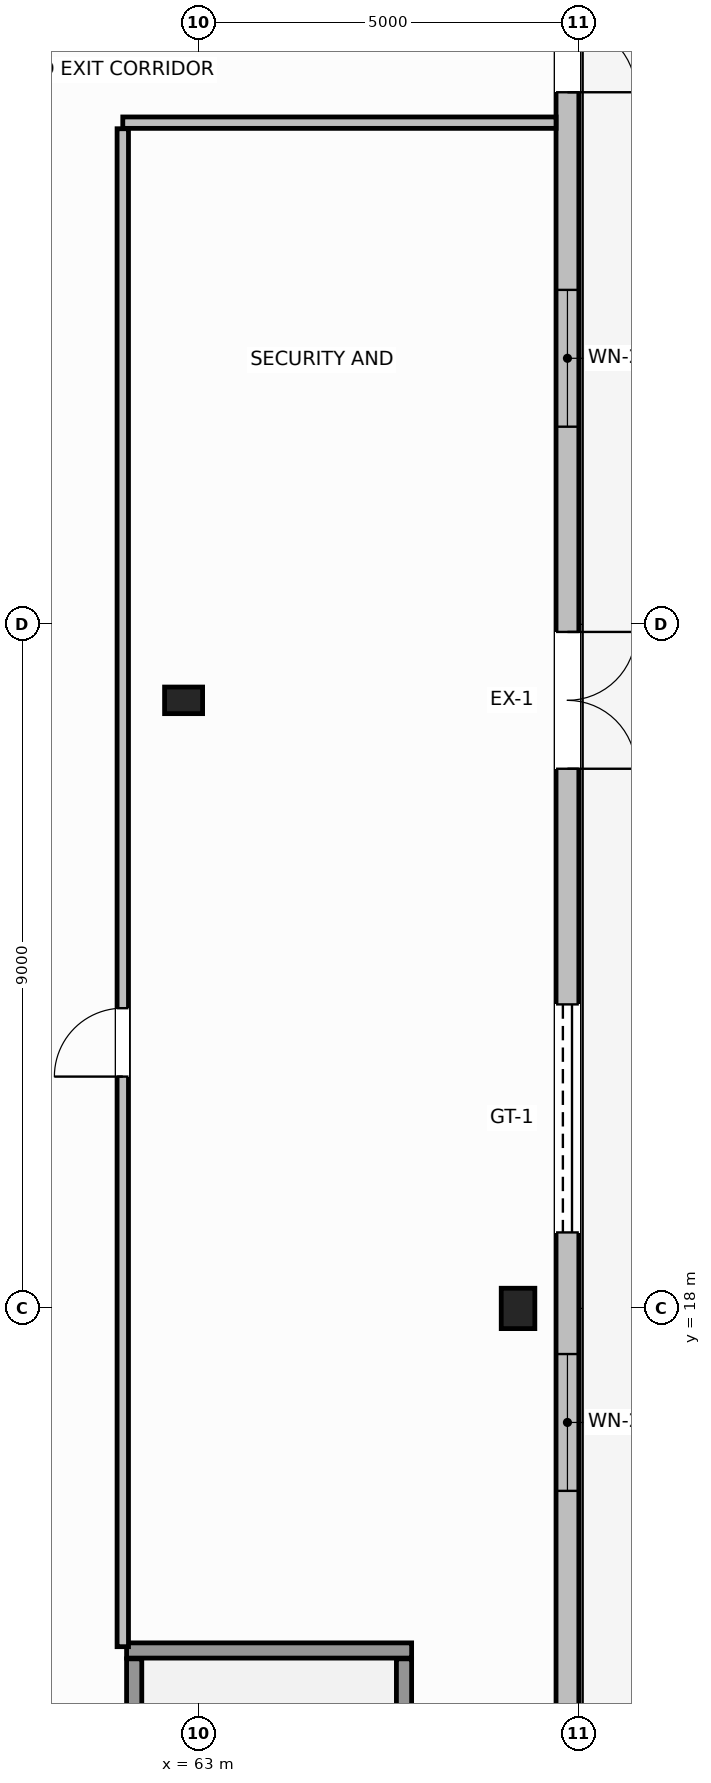
"""IFC4 building model, lengths in metres.
Left out: names, types, materials, properties, quantities, classifications, styles, units other than length and angle.
Written with IfcOpenShell. Run it as: python <this file> out.ifc"""

import sys

from ifc_helpers import new_model, si_unit, direction, frame, frame_2d, origin, origin_2d, place, context, subcontext, project, spatial, rectangle, i_section, extrude, source, transform, mapped, element, fill, save


model = new_model("IFC4")
c1 = context("Model", 3, precision=1e-05, world=origin(), true_north=direction((0.0, 1.0)))
c2 = subcontext(c1, "Body", "Model", "MODEL_VIEW")
j1 = project(units=[si_unit("LENGTHUNIT", "METRE"), si_unit("PLANEANGLEUNIT", "RADIAN")], contexts=[c1])
p1 = place(None, origin())
s1 = spatial("IfcSite", under=j1, at=p1, CompositionType="ELEMENT")
p2 = place(p1, origin())
s2 = spatial("IfcBuilding", under=s1, at=p2, CompositionType="ELEMENT")
p3 = place(p2, origin())
s3 = spatial("IfcBuildingStorey", under=s2, at=p3, CompositionType="ELEMENT", Elevation=0.0)
m1 = source(origin(), c2, "Body", "SweptSolid", [
    extrude(i_section(OverallWidth=0.442, OverallDepth=0.531, WebThickness=0.065, FlangeThickness=0.076, FilletRadius=0.015, at=origin_2d()), origin(), (0.0, 0.0, 1.0), 5.6),
])
p4 = place(p3, frame((67.2, 18.0, 0.0), z_axis=(0.0, 0.0, 1.0), x_axis=(1.0, 0.0, 0.0)))
e1 = element("IfcColumn", 1, at=p4, inside=s3, PredefinedType="COLUMN", context=c2, shape_type="MappedRepresentation", body=[
    mapped(m1, transform((0.0, 0.0, 0.0), scale=1.0)),
])
m2 = source(origin(), c2, "Body", "SweptSolid", [
    extrude(rectangle(XDim=0.5, YDim=0.35, at=origin_2d()), origin(), (0.0, 0.0, 1.0), 5.32),
])
p5 = place(p3, frame((62.8, 26.0, 0.0), z_axis=(0.0, 0.0, 1.0), x_axis=(1.0, 0.0, 0.0)))
e2 = element("IfcColumn", 2, at=p5, inside=s3, PredefinedType="PILASTER", context=c2, shape_type="MappedRepresentation", body=[
    mapped(m2, transform((0.0, 0.0, 0.0), scale=1.0)),
])
p6 = place(p3, frame((67.85, 50.34, 0.0), z_axis=(0.0, 0.0, 1.0), x_axis=(0.0, -1.0, 0.0)))
e3 = element("IfcWall", 3, at=p6, inside=s3, PredefinedType="STANDARD", context=c2, shape_type="SweptSolid", body=[
    extrude(rectangle(XDim=48.68, YDim=0.3, at=frame_2d((24.34, 0.0))), origin(), (0.0, 0.0, 1.0), 5.32),
])
p7 = place(p6, frame((14.54, 0.0, 0.0)))
e4 = element("IfcOpeningElement", 4, at=p7, cuts=e3, PredefinedType="OPENING", context=c2, shape_type="SweptSolid", body=[
    extrude(rectangle(XDim=1.8, YDim=2.4, at=frame_2d((0.9, 1.2))), frame((0.0, 0.16, 0.0), z_axis=(0.0, -1.0, 0.0), x_axis=(1.0, 0.0, 0.0)), (0.0, 0.0, 1.0), 0.32),
])
p8 = place(p6, frame((23.44, 0.0, 0.0)))
e5 = element("IfcOpeningElement", 5, at=p8, cuts=e3, PredefinedType="OPENING", context=c2, shape_type="SweptSolid", body=[
    extrude(rectangle(XDim=1.8, YDim=2.4, at=frame_2d((0.9, 1.2))), frame((0.0, 0.16, 0.0), z_axis=(0.0, -1.0, 0.0), x_axis=(1.0, 0.0, 0.0)), (0.0, 0.0, 1.0), 0.32),
])
p9 = place(p6, frame((4.84, 0.0, 0.0)))
e6 = element("IfcOpeningElement", 6, at=p9, cuts=e3, PredefinedType="OPENING", context=c2, shape_type="SweptSolid", body=[
    extrude(rectangle(XDim=3.0, YDim=2.8, at=frame_2d((1.5, 1.4))), frame((0.0, 0.16, 0.0), z_axis=(0.0, -1.0, 0.0), x_axis=(1.0, 0.0, 0.0)), (0.0, 0.0, 1.0), 0.32),
])
p10 = place(p6, frame((28.34, 0.0, 0.0)))
e7 = element("IfcOpeningElement", 7, at=p10, cuts=e3, PredefinedType="OPENING", context=c2, shape_type="SweptSolid", body=[
    extrude(rectangle(XDim=3.0, YDim=2.8, at=frame_2d((1.5, 1.4))), frame((0.0, 0.16, 0.0), z_axis=(0.0, -1.0, 0.0), x_axis=(1.0, 0.0, 0.0)), (0.0, 0.0, 1.0), 0.32),
])
p11 = place(p6, frame((32.94, 0.0, 1.1)))
e8 = element("IfcOpeningElement", 8, at=p11, cuts=e3, PredefinedType="OPENING", context=c2, shape_type="SweptSolid", body=[
    extrude(rectangle(XDim=1.8, YDim=2.0, at=frame_2d((0.9, 1.0))), frame((0.0, 0.16, 0.0), z_axis=(0.0, -1.0, 0.0), x_axis=(1.0, 0.0, 0.0)), (0.0, 0.0, 1.0), 0.32),
])
p12 = place(p6, frame((18.94, 0.0, 1.1)))
e9 = element("IfcOpeningElement", 9, at=p12, cuts=e3, PredefinedType="OPENING", context=c2, shape_type="SweptSolid", body=[
    extrude(rectangle(XDim=1.8, YDim=2.0, at=frame_2d((0.9, 1.0))), frame((0.0, 0.16, 0.0), z_axis=(0.0, -1.0, 0.0), x_axis=(1.0, 0.0, 0.0)), (0.0, 0.0, 1.0), 0.32),
])
p13 = place(p6, frame((9.94, 0.0, 1.1)))
e10 = element("IfcOpeningElement", 10, at=p13, cuts=e3, PredefinedType="OPENING", context=c2, shape_type="SweptSolid", body=[
    extrude(rectangle(XDim=1.8, YDim=2.0, at=frame_2d((0.9, 1.0))), frame((0.0, 0.16, 0.0), z_axis=(0.0, -1.0, 0.0), x_axis=(1.0, 0.0, 0.0)), (0.0, 0.0, 1.0), 0.32),
])
p14 = place(p3, frame((62.05, 13.5, 0.0), z_axis=(0.0, 0.0, 1.0), x_axis=(1.0, 0.0, 0.0)))
e11 = element("IfcWall", 11, at=p14, inside=s3, PredefinedType="SOLIDWALL", context=c2, shape_type="SweptSolid", body=[
    extrude(rectangle(XDim=3.75, YDim=0.2, at=frame_2d((1.875, 0.0))), origin(), (0.0, 0.0, 1.0), 5.6),
])
for number, where, z_axis, x_axis in (
    (12, (62.15, 3.21, 0.0), (0.0, 0.0, 1.0), (0.0, 1.0, 0.0)),
    (13, (65.7, 3.21, 0.0), (0.0, 0.0, 1.0), (0.0, 1.0, 0.0)),
):
    element("IfcWall", number, at=place(p3, frame(where, z_axis=z_axis, x_axis=x_axis)), inside=s3, PredefinedType="SOLIDWALL", context=c2, shape_type="SweptSolid", body=[
        extrude(rectangle(XDim=10.18, YDim=0.2, at=frame_2d((5.09, 0.0))), origin(), (0.0, 0.0, 1.0), 5.6),
    ])
p15 = place(p3, frame((62.0, 33.6, 0.0), z_axis=(0.0, 0.0, 1.0), x_axis=(1.0, 0.0, 0.0)))
e14 = element("IfcWall", 14, at=p15, inside=s3, PredefinedType="PARTITIONING", context=c2, shape_type="SweptSolid", body=[
    extrude(rectangle(XDim=5.7, YDim=0.15, at=frame_2d((2.85, 0.0))), origin(), (0.0, 0.0, 1.0), 5.32),
])
p16 = place(p3, frame((62.0, 13.55, 0.0), z_axis=(0.0, 0.0, 1.0), x_axis=(0.0, 1.0, 0.0)))
e15 = element("IfcWall", 15, at=p16, inside=s3, PredefinedType="PARTITIONING", context=c2, shape_type="SweptSolid", body=[
    extrude(rectangle(XDim=19.97, YDim=0.15, at=frame_2d((9.985, 0.0))), origin(), (0.0, 0.0, 1.0), 5.32),
])
p17 = place(p16, frame((7.5, 0.0, 0.0)))
e16 = element("IfcOpeningElement", 16, at=p17, cuts=e15, PredefinedType="OPENING", context=c2, shape_type="SweptSolid", body=[
    extrude(rectangle(XDim=0.9, YDim=2.15, at=frame_2d((0.45, 1.075))), frame((0.0, 0.085, 0.0), z_axis=(0.0, -1.0, 0.0), x_axis=(1.0, 0.0, 0.0)), (0.0, 0.0, 1.0), 0.17),
])
m3 = source(origin(), c2, "Body", "SweptSolid", [
    extrude(rectangle(XDim=1.8, YDim=2.4, at=frame_2d((0.9, 1.2))), frame((0.0, 0.025, 0.0), z_axis=(0.0, -1.0, 0.0), x_axis=(1.0, 0.0, 0.0)), (0.0, 0.0, 1.0), 0.05),
])
p18 = place(p7, origin())
e17 = element("IfcDoor", 17, at=p18, inside=s3, OperationType="DOUBLE_DOOR_SINGLE_SWING", PredefinedType="DOOR", context=c2, shape_type="MappedRepresentation", body=[
    mapped(m3, transform((0.0, 0.0, 0.0), scale=1.0)),
])
fill(e4, e17)
p19 = place(p8, origin())
e18 = element("IfcDoor", 18, at=p19, inside=s3, OperationType="DOUBLE_DOOR_SINGLE_SWING", PredefinedType="DOOR", context=c2, shape_type="MappedRepresentation", body=[
    mapped(m3, transform((0.0, 0.0, 0.0), scale=1.0)),
])
fill(e5, e18)
m4 = source(origin(), c2, "Body", "SweptSolid", [
    extrude(rectangle(XDim=3.0, YDim=2.8, at=frame_2d((1.5, 1.4))), frame((0.0, 0.025, 0.0), z_axis=(0.0, -1.0, 0.0), x_axis=(1.0, 0.0, 0.0)), (0.0, 0.0, 1.0), 0.05),
])
p20 = place(p10, origin())
e19 = element("IfcDoor", 19, at=p20, inside=s3, OperationType="ROLLINGUP", PredefinedType="GATE", context=c2, shape_type="MappedRepresentation", body=[
    mapped(m4, transform((0.0, 0.0, 0.0), scale=1.0)),
])
fill(e7, e19)
m5 = source(origin(), c2, "Body", "SweptSolid", [
    extrude(rectangle(XDim=1.8, YDim=2.0, at=frame_2d((0.9, 1.0))), frame((0.0, 0.03, 0.0), z_axis=(0.0, -1.0, 0.0), x_axis=(1.0, 0.0, 0.0)), (0.0, 0.0, 1.0), 0.06),
])
p21 = place(p11, origin())
e20 = element("IfcWindow", 20, at=p21, inside=s3, PartitioningType="SINGLE_PANEL", PredefinedType="WINDOW", context=c2, shape_type="MappedRepresentation", body=[
    mapped(m5, transform((0.0, 0.0, 0.0), scale=1.0)),
])
fill(e8, e20)
p22 = place(p12, origin())
e21 = element("IfcWindow", 21, at=p22, inside=s3, PartitioningType="SINGLE_PANEL", PredefinedType="WINDOW", context=c2, shape_type="MappedRepresentation", body=[
    mapped(m5, transform((0.0, 0.0, 0.0), scale=1.0)),
])
fill(e9, e21)
m6 = source(origin(), c2, "Body", "SweptSolid", [
    extrude(rectangle(XDim=0.9, YDim=2.15, at=frame_2d((0.45, 1.075))), frame((0.0, 0.025, 0.0), z_axis=(0.0, -1.0, 0.0), x_axis=(1.0, 0.0, 0.0)), (0.0, 0.0, 1.0), 0.05),
])
p23 = place(p17, origin())
e22 = element("IfcDoor", 22, at=p23, inside=s3, OperationType="SINGLE_SWING_RIGHT", PredefinedType="DOOR", context=c2, shape_type="MappedRepresentation", body=[
    mapped(m6, transform((0.0, 0.0, 0.0), scale=1.0)),
])
fill(e16, e22)
save(model, sys.argv[1])
